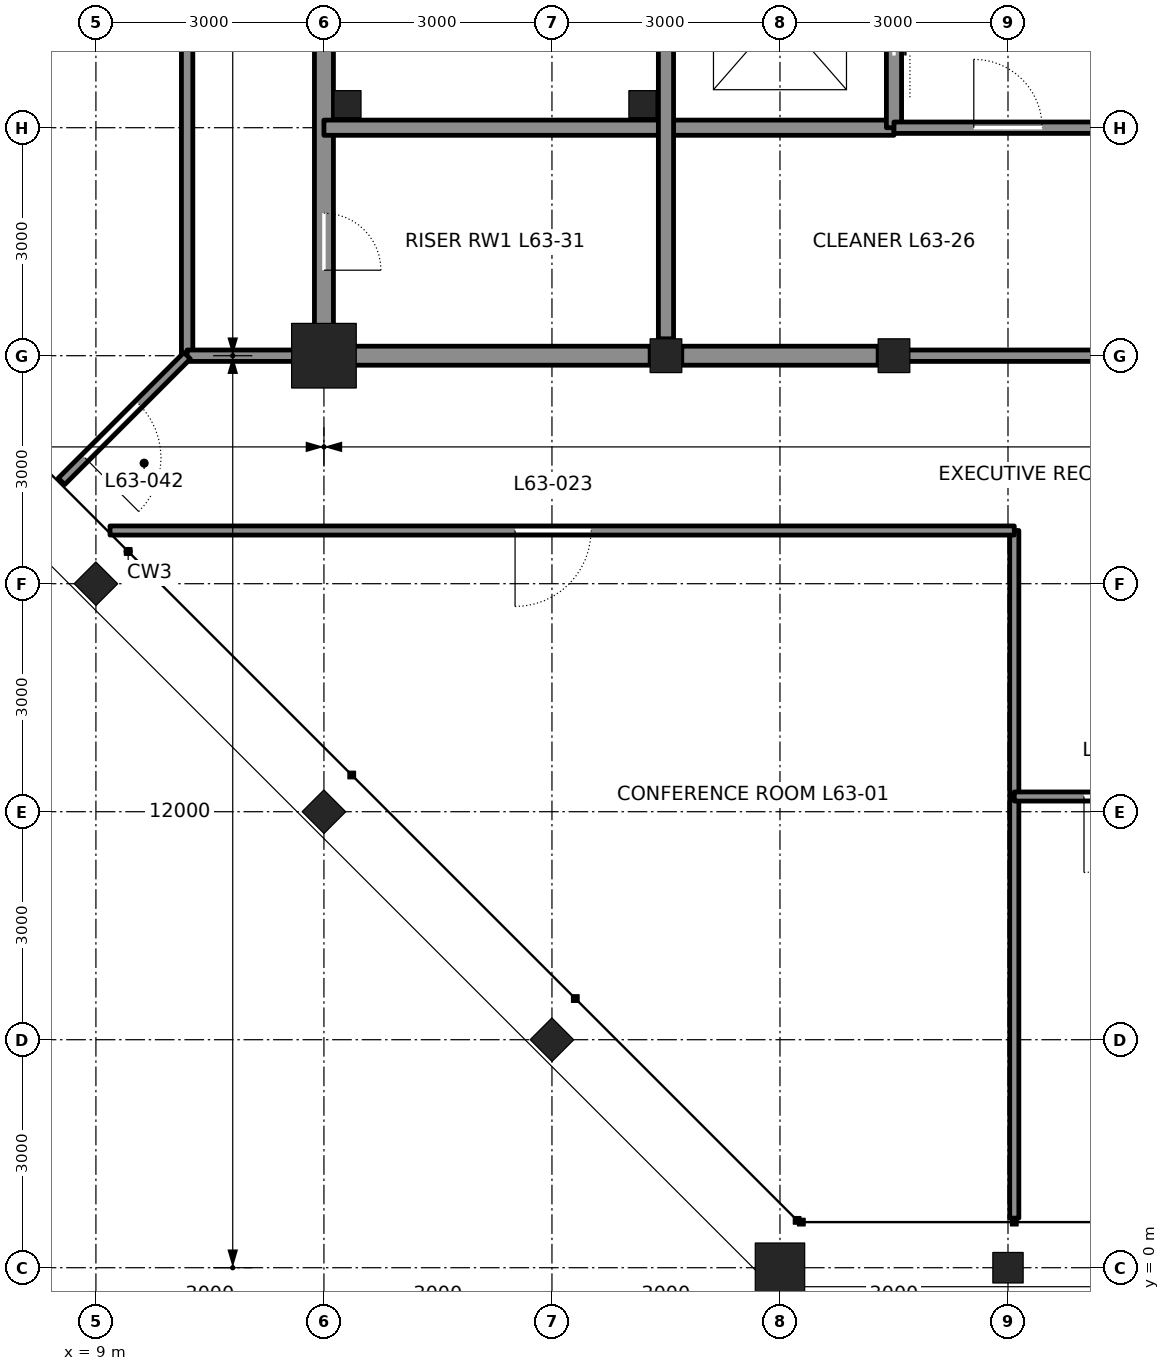
"""IFC4 building model, lengths in metres.
Left out: names, types, materials, properties, quantities, classifications, styles, units other than length and angle.
Written with IfcOpenShell. Run it as: python <this file> out.ifc"""

import sys

from ifc_helpers import new_model, si_unit, direction, frame, frame_2d, origin, origin_2d, place, context, subcontext, project, spatial, rectangle, hollow_rectangle, i_section, extrude, element, fill, save


model = new_model("IFC4")
c1 = context("Model", 3, precision=1e-05, world=origin(), true_north=direction((0.0, 1.0)))
c2 = subcontext(c1, "Body", "Model", "MODEL_VIEW")
j1 = project(units=[si_unit("LENGTHUNIT", "METRE"), si_unit("PLANEANGLEUNIT", "RADIAN")], contexts=[c1])
p1 = place(None, origin())
s1 = spatial("IfcSite", under=j1, at=p1, CompositionType="ELEMENT")
p2 = place(p1, origin())
s2 = spatial("IfcBuilding", under=s1, at=p2, CompositionType="ELEMENT")
p3 = place(p2, frame((0.0, 0.0, 283.2)))
s3 = spatial("IfcBuildingStorey", under=s2, at=p3, CompositionType="ELEMENT", Elevation=283.2)
p4 = place(p3, frame((18.0, 0.0, 0.0), z_axis=(0.0, 0.0, 1.0), x_axis=(0.0, -1.0, 0.0)))
e1 = element("IfcColumn", 1, at=p4, inside=s3, PredefinedType="COLUMN", context=c2, shape_type="SweptSolid", body=[
    extrude(hollow_rectangle(XDim=0.65, YDim=0.65, WallThickness=0.065, at=origin_2d()), origin(), (0.0, 0.0, 1.0), 4.2),
])
p5 = place(p3, frame((21.0, 0.0, 0.0), z_axis=(0.0, 0.0, 1.0), x_axis=(0.0, -1.0, 0.0)))
e2 = element("IfcColumn", 2, at=p5, inside=s3, PredefinedType="COLUMN", context=c2, shape_type="SweptSolid", body=[
    extrude(i_section(OverallWidth=0.401, OverallDepth=0.399, WebThickness=0.025, FlangeThickness=0.04, at=origin_2d()), origin(), (0.0, 0.0, 1.0), 4.2),
])
for number, where, z_axis, x_axis in (
    (3, (9.0, 9.0, 0.0), (0.0, 0.0, 1.0), (-0.707, -0.707, 0.0)),
    (4, (12.0, 6.0, 0.0), (0.0, 0.0, 1.0), (-0.707, -0.707, 0.0)),
    (5, (15.0, 3.0, 0.0), (0.0, 0.0, 1.0), (-0.707, -0.707, 0.0)),
):
    element("IfcColumn", number, at=place(p3, frame(where, z_axis=z_axis, x_axis=x_axis)), inside=s3, PredefinedType="COLUMN", context=c2, shape_type="SweptSolid", body=[
        extrude(i_section(OverallWidth=0.404, OverallDepth=0.406, WebThickness=0.027, FlangeThickness=0.044, at=origin_2d()), origin(), (0.0, 0.0, 1.0), 4.2),
    ])
p6 = place(p3, frame((12.0, 12.0, 0.0), z_axis=(0.0, 0.0, 1.0), x_axis=(1.0, 0.0, 0.0)))
e6 = element("IfcColumn", 6, at=p6, inside=s3, PredefinedType="COLUMN", context=c2, shape_type="SweptSolid", body=[
    extrude(hollow_rectangle(XDim=0.85, YDim=0.85, WallThickness=0.085, at=origin_2d()), origin(), (0.0, 0.0, 1.0), 4.2),
])
for number, where, z_axis, x_axis in (
    (7, (16.5, 12.0, 0.0), (0.0, 0.0, 1.0), (1.0, 0.0, 0.0)),
    (8, (19.5, 12.0, 0.0), (0.0, 0.0, 1.0), (1.0, 0.0, 0.0)),
):
    element("IfcColumn", number, at=place(p3, frame(where, z_axis=z_axis, x_axis=x_axis)), inside=s3, PredefinedType="COLUMN", context=c2, shape_type="SweptSolid", body=[
        extrude(i_section(OverallWidth=0.417, OverallDepth=0.445, WebThickness=0.039, FlangeThickness=0.063, at=origin_2d()), origin(), (0.0, 0.0, 1.0), 4.2),
    ])
p7 = place(p3, frame((12.0, 12.25, 0.0), z_axis=(0.0, 0.0, 1.0), x_axis=(0.0, 1.0, 0.0)))
e9 = element("IfcWall", 9, at=p7, inside=s3, PredefinedType="SOLIDWALL", context=c2, shape_type="SweptSolid", body=[
    extrude(rectangle(XDim=8.528, YDim=0.25, at=frame_2d((4.264, 0.0))), origin(), (0.0, 0.0, 1.0), 3.113),
])
p8 = place(p7, frame((0.875, 0.0, 0.0)))
e10 = element("IfcOpeningElement", 10, at=p8, cuts=e9, PredefinedType="OPENING", context=c2, shape_type="SweptSolid", body=[
    extrude(rectangle(XDim=0.75, YDim=2.1, at=frame_2d((0.375, 1.05))), frame((0.0, 0.135, 0.0), z_axis=(0.0, -1.0, 0.0), x_axis=(1.0, 0.0, 0.0)), (0.0, 0.0, 1.0), 0.27),
])
p9 = place(p3, frame((12.25, 12.0, 0.0), z_axis=(0.0, 0.0, 1.0), x_axis=(1.0, 0.0, 0.0)))
e11 = element("IfcWall", 11, at=p9, inside=s3, PredefinedType="SOLIDWALL", context=c2, shape_type="SweptSolid", body=[
    extrude(rectangle(XDim=4.042, YDim=0.25, at=frame_2d((2.021, 0.0))), origin(), (0.0, 0.0, 1.0), 3.182),
])
p10 = place(p3, frame((16.708, 12.0, 0.0), z_axis=(0.0, 0.0, 1.0), x_axis=(1.0, 0.0, 0.0)))
e12 = element("IfcWall", 12, at=p10, inside=s3, PredefinedType="SOLIDWALL", context=c2, shape_type="SweptSolid", body=[
    extrude(rectangle(XDim=2.583, YDim=0.25, at=frame_2d((1.292, 0.0))), origin(), (0.0, 0.0, 1.0), 3.182),
])
p11 = place(p3, frame((12.0, 15.0, 0.0), z_axis=(0.0, 0.0, 1.0), x_axis=(1.0, 0.0, 0.0)))
e13 = element("IfcWall", 13, at=p11, inside=s3, PredefinedType="SOLIDWALL", context=c2, shape_type="SweptSolid", body=[
    extrude(rectangle(XDim=7.5, YDim=0.2, at=frame_2d((3.75, 0.0))), origin(), (0.0, 0.0, 1.0), 4.04),
])
p12 = place(p3, frame((16.5, 12.222, 0.0), z_axis=(0.0, 0.0, 1.0), x_axis=(0.0, 1.0, 0.0)))
e14 = element("IfcWall", 14, at=p12, inside=s3, PredefinedType="SOLIDWALL", context=c2, shape_type="SweptSolid", body=[
    extrude(rectangle(XDim=8.555, YDim=0.2, at=frame_2d((4.278, 0.0))), origin(), (0.0, 0.0, 1.0), 3.113),
])
p13 = place(p3, frame((19.5, 15.0, 0.0), z_axis=(0.0, 0.0, 1.0), x_axis=(0.0, 1.0, 0.0)))
e15 = element("IfcWall", 15, at=p13, inside=s3, PredefinedType="SOLIDWALL", context=c2, shape_type="SweptSolid", body=[
    extrude(rectangle(XDim=12.0, YDim=0.2, at=frame_2d((6.0, 0.0))), origin(), (0.0, 0.0, 1.0), 3.065),
])
p14 = place(p13, frame((0.95, 0.0, 0.0)))
e16 = element("IfcOpeningElement", 16, at=p14, cuts=e15, PredefinedType="OPENING", context=c2, shape_type="SweptSolid", body=[
    extrude(rectangle(XDim=1.1, YDim=2.1, at=frame_2d((0.55, 1.05))), frame((0.0, 0.11, 0.0), z_axis=(0.0, -1.0, 0.0), x_axis=(1.0, 0.0, 0.0)), (0.0, 0.0, 1.0), 0.22),
])
p15 = place(p13, frame((3.95, 0.0, 0.0)))
e17 = element("IfcOpeningElement", 17, at=p15, cuts=e15, PredefinedType="OPENING", context=c2, shape_type="SweptSolid", body=[
    extrude(rectangle(XDim=1.1, YDim=2.1, at=frame_2d((0.55, 1.05))), frame((0.0, 0.11, 0.0), z_axis=(0.0, -1.0, 0.0), x_axis=(1.0, 0.0, 0.0)), (0.0, 0.0, 1.0), 0.22),
])
p16 = place(p13, frame((6.95, 0.0, 0.0)))
e18 = element("IfcOpeningElement", 18, at=p16, cuts=e15, PredefinedType="OPENING", context=c2, shape_type="SweptSolid", body=[
    extrude(rectangle(XDim=1.1, YDim=2.1, at=frame_2d((0.55, 1.05))), frame((0.0, 0.11, 0.0), z_axis=(0.0, -1.0, 0.0), x_axis=(1.0, 0.0, 0.0)), (0.0, 0.0, 1.0), 0.22),
])
p17 = place(p13, frame((9.95, 0.0, 0.0)))
e19 = element("IfcOpeningElement", 19, at=p17, cuts=e15, PredefinedType="OPENING", context=c2, shape_type="SweptSolid", body=[
    extrude(rectangle(XDim=1.1, YDim=2.1, at=frame_2d((0.55, 1.05))), frame((0.0, 0.11, 0.0), z_axis=(0.0, -1.0, 0.0), x_axis=(1.0, 0.0, 0.0)), (0.0, 0.0, 1.0), 0.22),
])
p18 = place(p3, frame((19.5, 15.0, 0.0), z_axis=(0.0, 0.0, 1.0), x_axis=(1.0, 0.0, 0.0)))
e20 = element("IfcWall", 20, at=p18, inside=s3, PredefinedType="PARTITIONING", context=c2, shape_type="SweptSolid", body=[
    extrude(rectangle(XDim=6.0, YDim=0.15, at=frame_2d((3.0, 0.0))), origin(), (0.0, 0.0, 1.0), 4.04),
])
p19 = place(p18, frame((4.0, 0.0, 0.0)))
e21 = element("IfcOpeningElement", 21, at=p19, cuts=e20, PredefinedType="OPENING", context=c2, shape_type="SweptSolid", body=[
    extrude(rectangle(XDim=1.0, YDim=2.1, at=frame_2d((0.5, 1.05))), frame((0.0, 0.085, 0.0), z_axis=(0.0, -1.0, 0.0), x_axis=(1.0, 0.0, 0.0)), (0.0, 0.0, 1.0), 0.17),
])
p20 = place(p18, frame((1.05, 0.0, 0.0)))
e22 = element("IfcOpeningElement", 22, at=p20, cuts=e20, PredefinedType="OPENING", context=c2, shape_type="SweptSolid", body=[
    extrude(rectangle(XDim=0.9, YDim=2.1, at=frame_2d((0.45, 1.05))), frame((0.0, 0.085, 0.0), z_axis=(0.0, -1.0, 0.0), x_axis=(1.0, 0.0, 0.0)), (0.0, 0.0, 1.0), 0.17),
])
p21 = place(p3, frame((19.5, 12.0, 0.0), z_axis=(0.0, 0.0, 1.0), x_axis=(1.0, 0.0, 0.0)))
e23 = element("IfcWall", 23, at=p21, inside=s3, PredefinedType="PARTITIONING", context=c2, shape_type="SweptSolid", body=[
    extrude(rectangle(XDim=6.0, YDim=0.15, at=frame_2d((3.0, 0.0))), origin(), (0.0, 0.0, 1.0), 3.182),
])
p22 = place(p3, frame((21.083, 0.653, 0.0), z_axis=(0.0, 0.0, 1.0), x_axis=(0.0, 1.0, 0.0)))
e24 = element("IfcWall", 24, at=p22, inside=s3, PredefinedType="PARTITIONING", context=c2, shape_type="SweptSolid", body=[
    extrude(rectangle(XDim=9.047, YDim=0.12, at=frame_2d((4.524, 0.0))), origin(), (0.0, 0.0, 1.0), 3.357),
])
p23 = place(p3, frame((9.186, 9.7, 0.0), z_axis=(0.0, 0.0, 1.0), x_axis=(1.0, 0.0, 0.0)))
e25 = element("IfcWall", 25, at=p23, inside=s3, PredefinedType="PARTITIONING", context=c2, shape_type="SweptSolid", body=[
    extrude(rectangle(XDim=11.897, YDim=0.12, at=frame_2d((5.949, 0.0))), origin(), (0.0, 0.0, 1.0), 4.04),
])
p24 = place(p23, frame((5.329, 0.0, 0.0)))
e26 = element("IfcOpeningElement", 26, at=p24, cuts=e25, PredefinedType="OPENING", context=c2, shape_type="SweptSolid", body=[
    extrude(rectangle(XDim=1.0, YDim=2.4, at=frame_2d((0.5, 1.2))), frame((0.0, 0.07, 0.0), z_axis=(0.0, -1.0, 0.0), x_axis=(1.0, 0.0, 0.0)), (0.0, 0.0, 1.0), 0.14),
])
p25 = place(p3, frame((21.083, 6.2, 0.0), z_axis=(0.0, 0.0, 1.0), x_axis=(1.0, 0.0, 0.0)))
e27 = element("IfcWall", 27, at=p25, inside=s3, PredefinedType="PARTITIONING", context=c2, shape_type="SweptSolid", body=[
    extrude(rectangle(XDim=2.834, YDim=0.12, at=frame_2d((1.417, 0.0))), origin(), (0.0, 0.0, 1.0), 4.04),
])
p26 = place(p25, frame((0.917, 0.0, 0.0)))
e28 = element("IfcOpeningElement", 28, at=p26, cuts=e27, PredefinedType="OPENING", context=c2, shape_type="SweptSolid", body=[
    extrude(rectangle(XDim=1.0, YDim=2.4, at=frame_2d((0.5, 1.2))), frame((0.0, 0.07, 0.0), z_axis=(0.0, -1.0, 0.0), x_axis=(1.0, 0.0, 0.0)), (0.0, 0.0, 1.0), 0.14),
])
p27 = place(p3, frame((10.2, 12.0, 0.0), z_axis=(0.0, 0.0, 1.0), x_axis=(0.0, 1.0, 0.0)))
e29 = element("IfcWall", 29, at=p27, inside=s3, PredefinedType="PARTITIONING", context=c2, shape_type="SweptSolid", body=[
    extrude(rectangle(XDim=24.314, YDim=0.15, at=frame_2d((12.157, 0.0))), origin(), (0.0, 0.0, 1.0), 4.04),
])
p28 = place(p27, frame((11.5, 0.0, 0.0)))
e30 = element("IfcOpeningElement", 30, at=p28, cuts=e29, PredefinedType="OPENING", context=c2, shape_type="SweptSolid", body=[
    extrude(rectangle(XDim=1.0, YDim=2.4, at=frame_2d((0.5, 1.2))), frame((0.0, 0.085, 0.0), z_axis=(0.0, -1.0, 0.0), x_axis=(1.0, 0.0, 0.0)), (0.0, 0.0, 1.0), 0.17),
])
p29 = place(p3, frame((10.2, 12.0, 0.0), z_axis=(0.0, 0.0, 1.0), x_axis=(1.0, 0.0, 0.0)))
e31 = element("IfcWall", 31, at=p29, inside=s3, PredefinedType="PARTITIONING", context=c2, shape_type="SweptSolid", body=[
    extrude(rectangle(XDim=1.8, YDim=0.15, at=frame_2d((0.9, 0.0))), origin(), (0.0, 0.0, 1.0), 3.271),
])
p30 = place(p3, frame((10.2, 12.0, 0.0), z_axis=(0.0, 0.0, 1.0), x_axis=(-0.707106781187, -0.707106781187, 0.0)))
e32 = element("IfcWall", 32, at=p30, inside=s3, PredefinedType="PARTITIONING", context=c2, shape_type="SweptSolid", body=[
    extrude(rectangle(XDim=2.338, YDim=0.12, at=frame_2d((1.169, 0.0))), origin(), (0.0, 0.0, 1.0), 4.04),
])
p31 = place(p30, frame((0.9, 0.0, 0.0)))
e33 = element("IfcOpeningElement", 33, at=p31, cuts=e32, PredefinedType="OPENING", context=c2, shape_type="SweptSolid", body=[
    extrude(rectangle(XDim=1.0, YDim=2.4, at=frame_2d((0.5, 1.2))), frame((0.0, 0.07, 0.0), z_axis=(0.0, -1.0, 0.0), x_axis=(1.0, 0.0, 0.0)), (0.0, 0.0, 1.0), 0.14),
])
for number, where, z_axis, x_axis in (
    (34, (12.31, 15.31, 0.0), (0.0, 0.0, 1.0), (1.0, 0.0, 0.0)),
    (35, (16.19, 15.31, 0.0), (0.0, 0.0, 1.0), (1.0, 0.0, 0.0)),
):
    element("IfcColumn", number, at=place(p3, frame(where, z_axis=z_axis, x_axis=x_axis)), inside=s3, PredefinedType="COLUMN", context=c2, shape_type="SweptSolid", body=[
        extrude(hollow_rectangle(XDim=0.356, YDim=0.356, WallThickness=0.009, at=origin_2d()), origin(), (0.0, 0.0, 1.0), 4.2),
    ])
p32 = place(p8, frame((0.75, 0.0, 0.0), z_axis=(0.0, 0.0, 1.0), x_axis=(-1.0, 0.0, 0.0)))
e36 = element("IfcDoor", 36, at=p32, inside=s3, OperationType="SINGLE_SWING_RIGHT", PredefinedType="DOOR", context=c2, shape_type="SweptSolid", body=[
    extrude(rectangle(XDim=0.75, YDim=2.1, at=frame_2d((0.375, 1.05))), frame((0.0, 0.025, 0.0), z_axis=(0.0, -1.0, 0.0), x_axis=(1.0, 0.0, 0.0)), (0.0, 0.0, 1.0), 0.05),
])
fill(e10, e36)
p33 = place(p20, origin())
e37 = element("IfcDoor", 37, at=p33, inside=s3, OperationType="SINGLE_SWING_LEFT", PredefinedType="DOOR", context=c2, shape_type="SweptSolid", body=[
    extrude(rectangle(XDim=0.9, YDim=2.1, at=frame_2d((0.45, 1.05))), frame((0.0, 0.025, 0.0), z_axis=(0.0, -1.0, 0.0), x_axis=(1.0, 0.0, 0.0)), (0.0, 0.0, 1.0), 0.05),
])
fill(e22, e37)
p34 = place(p14, origin())
e38 = element("IfcDoor", 38, at=p34, inside=s3, OperationType="DOUBLE_DOOR_SLIDING", PredefinedType="DOOR", context=c2, shape_type="SweptSolid", body=[
    extrude(rectangle(XDim=1.1, YDim=2.1, at=frame_2d((0.55, 1.05))), frame((0.0, 0.025, 0.0), z_axis=(0.0, -1.0, 0.0), x_axis=(1.0, 0.0, 0.0)), (0.0, 0.0, 1.0), 0.05),
])
fill(e16, e38)
p35 = place(p24, frame((1.0, 0.0, 0.0), z_axis=(0.0, 0.0, 1.0), x_axis=(-1.0, 0.0, 0.0)))
e39 = element("IfcDoor", 39, at=p35, inside=s3, OperationType="SINGLE_SWING_RIGHT", PredefinedType="DOOR", context=c2, shape_type="SweptSolid", body=[
    extrude(rectangle(XDim=1.0, YDim=2.4, at=frame_2d((0.5, 1.2))), frame((0.0, 0.025, 0.0), z_axis=(0.0, -1.0, 0.0), x_axis=(1.0, 0.0, 0.0)), (0.0, 0.0, 1.0), 0.05),
])
fill(e26, e39)
p36 = place(p26, frame((1.0, 0.0, 0.0), z_axis=(0.0, 0.0, 1.0), x_axis=(-1.0, 0.0, 0.0)))
e40 = element("IfcDoor", 40, at=p36, inside=s3, OperationType="SINGLE_SWING_RIGHT", PredefinedType="DOOR", context=c2, shape_type="SweptSolid", body=[
    extrude(rectangle(XDim=1.0, YDim=2.4, at=frame_2d((0.5, 1.2))), frame((0.0, 0.025, 0.0), z_axis=(0.0, -1.0, 0.0), x_axis=(1.0, 0.0, 0.0)), (0.0, 0.0, 1.0), 0.05),
])
fill(e28, e40)
p37 = place(p31, origin())
e41 = element("IfcDoor", 41, at=p37, inside=s3, OperationType="SINGLE_SWING_RIGHT", PredefinedType="DOOR", context=c2, shape_type="SweptSolid", body=[
    extrude(rectangle(XDim=1.0, YDim=2.4, at=frame_2d((0.5, 1.2))), frame((0.0, 0.025, 0.0), z_axis=(0.0, -1.0, 0.0), x_axis=(1.0, 0.0, 0.0)), (0.0, 0.0, 1.0), 0.05),
])
fill(e33, e41)
save(model, sys.argv[1])
